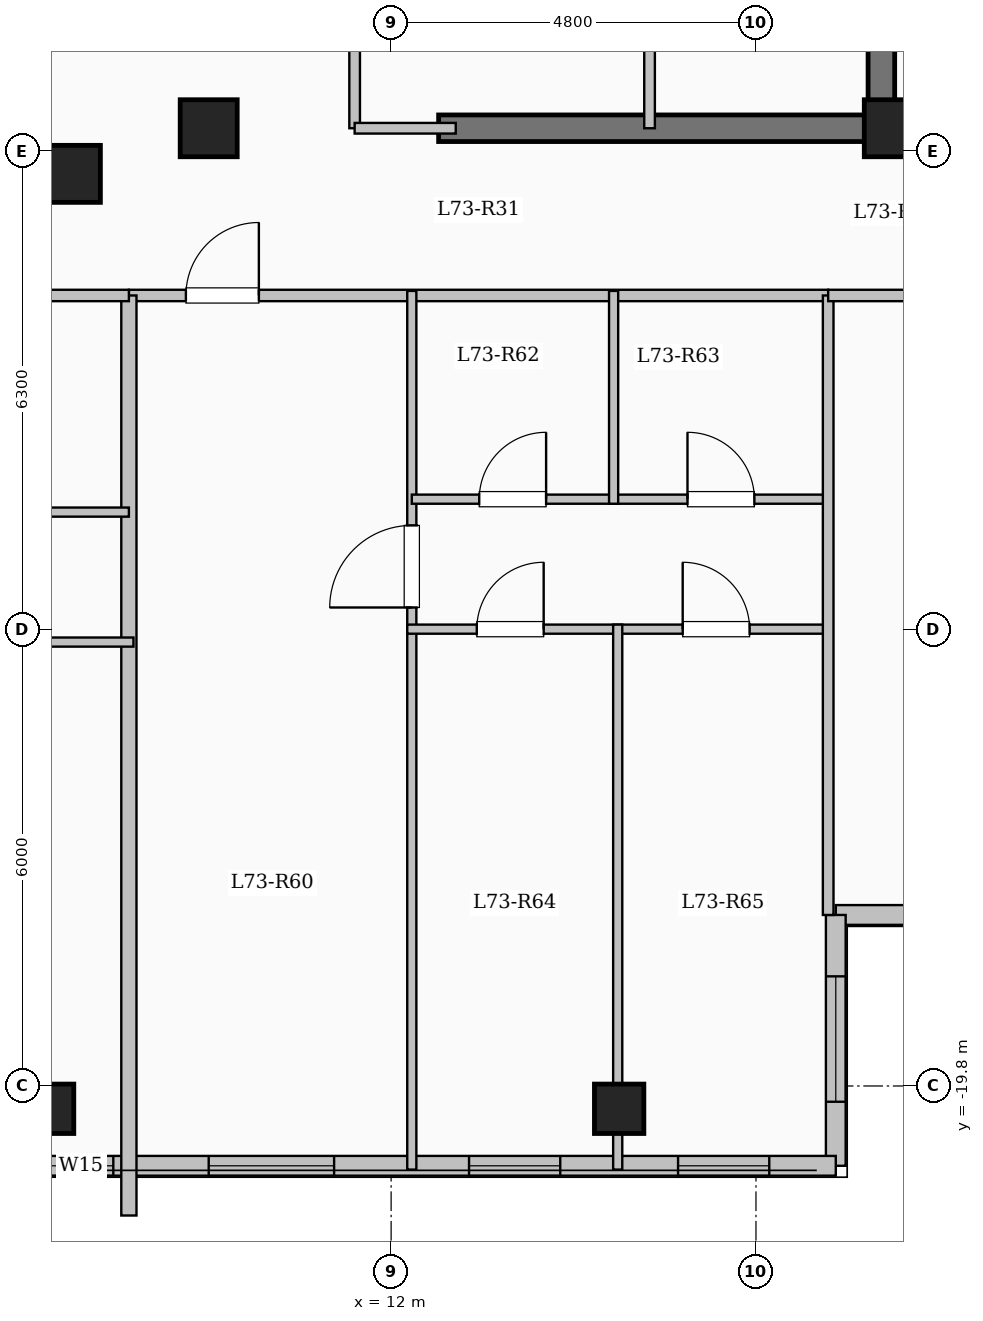
"""IFC4 building model, lengths in metres.
Left out: names, types, materials, properties, quantities, classifications, styles, units other than length and angle.
Written with IfcOpenShell. Run it as: python <this file> out.ifc"""

import sys

from ifc_helpers import new_model, si_unit, direction, frame, frame_2d, origin, origin_2d, place, context, subcontext, project, spatial, rectangle, extrude, element, fill, save


model = new_model("IFC4")
c1 = context("Model", 3, precision=1e-05, world=origin(), true_north=direction((0.0, 1.0)))
c2 = subcontext(c1, "Body", "Model", "MODEL_VIEW")
j1 = project(units=[si_unit("LENGTHUNIT", "METRE"), si_unit("PLANEANGLEUNIT", "RADIAN")], contexts=[c1])
p1 = place(None, origin())
s1 = spatial("IfcSite", under=j1, at=p1, CompositionType="ELEMENT")
p2 = place(p1, origin())
s2 = spatial("IfcBuilding", under=s1, at=p2, CompositionType="ELEMENT")
p3 = place(p2, frame((0.0, 0.0, 268.3)))
s3 = spatial("IfcBuildingStorey", under=s2, at=p3, CompositionType="ELEMENT", Elevation=268.3)
for number, where, z_axis, x_axis in (
    (1, (7.8, -7.8, 0.0), (0.0, 0.0, 1.0), (1.0, 0.0, 0.0)),
    (2, (9.6, -7.2, 0.0), (0.0, 0.0, 1.0), (1.0, 0.0, 0.0)),
    (3, (18.6, -7.2, 0.0), (0.0, 0.0, 1.0), (1.0, 0.0, 0.0)),
):
    element("IfcColumn", number, at=place(p3, frame(where, z_axis=z_axis, x_axis=x_axis)), inside=s3, PredefinedType="COLUMN", context=c2, shape_type="SweptSolid", body=[
        extrude(rectangle(XDim=0.75, YDim=0.75, at=origin_2d()), origin(), (0.0, 0.0, 1.0), 3.35),
    ])
for number, where, z_axis, x_axis in (
    (4, (7.5, -20.1, 0.0), (0.0, 0.0, 1.0), (1.0, 0.0, 0.0)),
    (5, (15.0, -20.1, 0.0), (0.0, 0.0, 1.0), (1.0, 0.0, 0.0)),
):
    element("IfcColumn", number, at=place(p3, frame(where, z_axis=z_axis, x_axis=x_axis)), inside=s3, PredefinedType="COLUMN", context=c2, shape_type="SweptSolid", body=[
        extrude(rectangle(XDim=0.65, YDim=0.65, at=origin_2d()), origin(), (0.0, 0.0, 1.0), 3.35),
    ])
p4 = place(p3, frame((22.65, -17.55, 0.0), z_axis=(0.0, 0.0, 1.0), x_axis=(-1.0, 0.0, 0.0)))
e6 = element("IfcWall", 6, at=p4, inside=s3, PredefinedType="SOLIDWALL", context=c2, shape_type="SweptSolid", body=[
    extrude(rectangle(XDim=4.8, YDim=0.26, at=frame_2d((2.4, 0.0))), origin(), (0.0, 0.0, 1.0), 3.05),
])
p5 = place(p4, frame((1.325, 0.0, 0.9)))
e7 = element("IfcOpeningElement", 7, at=p5, cuts=e6, PredefinedType="OPENING", context=c2, shape_type="SweptSolid", body=[
    extrude(rectangle(XDim=2.2, YDim=1.75, at=frame_2d((1.1, 0.875))), frame((0.0, 0.14, 0.0), z_axis=(0.0, -1.0, 0.0), x_axis=(1.0, 0.0, 0.0)), (0.0, 0.0, 1.0), 0.28),
])
p6 = place(p3, frame((17.85, -17.55, 0.0), z_axis=(0.0, 0.0, 1.0), x_axis=(0.0, -1.0, 0.0)))
e8 = element("IfcWall", 8, at=p6, inside=s3, PredefinedType="SOLIDWALL", context=c2, shape_type="SweptSolid", body=[
    extrude(rectangle(XDim=3.3, YDim=0.26, at=frame_2d((1.65, 0.0))), origin(), (0.0, 0.0, 1.0), 3.05),
])
p7 = place(p6, frame((0.808, 0.0, 0.9)))
e9 = element("IfcOpeningElement", 9, at=p7, cuts=e8, PredefinedType="OPENING", context=c2, shape_type="SweptSolid", body=[
    extrude(rectangle(XDim=1.65, YDim=1.6, at=frame_2d((0.825, 0.8))), frame((0.0, 0.14, 0.0), z_axis=(0.0, -1.0, 0.0), x_axis=(1.0, 0.0, 0.0)), (0.0, 0.0, 1.0), 0.28),
])
p8 = place(p3, frame((17.85, -20.85, 0.0), z_axis=(0.0, 0.0, 1.0), x_axis=(-1.0, 0.0, 0.0)))
e10 = element("IfcWall", 10, at=p8, inside=s3, PredefinedType="SOLIDWALL", context=c2, shape_type="SweptSolid", body=[
    extrude(rectangle(XDim=10.5, YDim=0.26, at=frame_2d((5.25, 0.0))), origin(), (0.0, 0.0, 1.0), 3.05),
])
p9 = place(p8, frame((0.875, 0.0, 0.95)))
e11 = element("IfcOpeningElement", 11, at=p9, cuts=e10, PredefinedType="OPENING", context=c2, shape_type="SweptSolid", body=[
    extrude(rectangle(XDim=1.2, YDim=1.5, at=frame_2d((0.6, 0.75))), frame((0.0, 0.14, 0.0), z_axis=(0.0, -1.0, 0.0), x_axis=(1.0, 0.0, 0.0)), (0.0, 0.0, 1.0), 0.28),
])
p10 = place(p8, frame((3.625, 0.0, 0.95)))
e12 = element("IfcOpeningElement", 12, at=p10, cuts=e10, PredefinedType="OPENING", context=c2, shape_type="SweptSolid", body=[
    extrude(rectangle(XDim=1.2, YDim=1.5, at=frame_2d((0.6, 0.75))), frame((0.0, 0.14, 0.0), z_axis=(0.0, -1.0, 0.0), x_axis=(1.0, 0.0, 0.0)), (0.0, 0.0, 1.0), 0.28),
])
p11 = place(p8, frame((6.6, 0.0, 0.9)))
e13 = element("IfcOpeningElement", 13, at=p11, cuts=e10, PredefinedType="OPENING", context=c2, shape_type="SweptSolid", body=[
    extrude(rectangle(XDim=1.65, YDim=1.6, at=frame_2d((0.825, 0.8))), frame((0.0, 0.14, 0.0), z_axis=(0.0, -1.0, 0.0), x_axis=(1.0, 0.0, 0.0)), (0.0, 0.0, 1.0), 0.28),
])
p12 = place(p8, frame((9.505, 0.0, 0.95)))
e14 = element("IfcOpeningElement", 14, at=p12, cuts=e10, PredefinedType="OPENING", context=c2, shape_type="SweptSolid", body=[
    extrude(rectangle(XDim=0.85, YDim=1.5, at=frame_2d((0.425, 0.75))), frame((0.0, 0.14, 0.0), z_axis=(0.0, -1.0, 0.0), x_axis=(1.0, 0.0, 0.0)), (0.0, 0.0, 1.0), 0.28),
])
p13 = place(p3, frame((18.45, -7.375, 0.0), z_axis=(0.0, 0.0, 1.0), x_axis=(0.0, 1.0, 0.0)))
e15 = element("IfcWall", 15, at=p13, inside=s3, PredefinedType="SHEAR", context=c2, shape_type="SweptSolid", body=[
    extrude(rectangle(XDim=14.05, YDim=0.35, at=frame_2d((7.025, 0.0))), origin(), (0.0, 0.0, 1.0), 3.35),
])
p14 = place(p3, frame((12.625, -7.2, 0.0), z_axis=(0.0, 0.0, 1.0), x_axis=(1.0, 0.0, 0.0)))
e16 = element("IfcWall", 16, at=p14, inside=s3, PredefinedType="SHEAR", context=c2, shape_type="SweptSolid", body=[
    extrude(rectangle(XDim=6.0, YDim=0.35, at=frame_2d((3.0, 0.0))), origin(), (0.0, 0.0, 1.0), 3.35),
])
p15 = place(p3, frame((15.4, -7.2, 0.0), z_axis=(0.0, 0.0, 1.0), x_axis=(0.0, 1.0, 0.0)))
e17 = element("IfcWall", 17, at=p15, inside=s3, PredefinedType="PARTITIONING", context=c2, shape_type="SweptSolid", body=[
    extrude(rectangle(XDim=10.45, YDim=0.14, at=frame_2d((5.225, 0.0))), origin(), (0.0, 0.0, 1.0), 3.05),
])
p16 = place(p15, frame((9.25, 0.0, 0.0)))
e18 = element("IfcOpeningElement", 18, at=p16, cuts=e17, PredefinedType="OPENING", context=c2, shape_type="SweptSolid", body=[
    extrude(rectangle(XDim=0.9, YDim=2.08, at=frame_2d((0.45, 1.04))), frame((0.0, 0.08, 0.0), z_axis=(0.0, -1.0, 0.0), x_axis=(1.0, 0.0, 0.0)), (0.0, 0.0, 1.0), 0.16),
])
p17 = place(p3, frame((11.52, -7.2, 0.0), z_axis=(0.0, 0.0, 1.0), x_axis=(0.0, 1.0, 0.0)))
e19 = element("IfcWall", 19, at=p17, inside=s3, PredefinedType="PARTITIONING", context=c2, shape_type="SweptSolid", body=[
    extrude(rectangle(XDim=9.12, YDim=0.14, at=frame_2d((4.56, 0.0))), origin(), (0.0, 0.0, 1.0), 3.05),
])
p18 = place(p17, frame((3.8, 0.0, 0.0)))
e20 = element("IfcOpeningElement", 20, at=p18, cuts=e19, PredefinedType="OPENING", context=c2, shape_type="SweptSolid", body=[
    extrude(rectangle(XDim=0.9, YDim=2.08, at=frame_2d((0.45, 1.04))), frame((0.0, 0.08, 0.0), z_axis=(0.0, -1.0, 0.0), x_axis=(1.0, 0.0, 0.0)), (0.0, 0.0, 1.0), 0.16),
])
p19 = place(p3, frame((11.52, -7.2, 0.0), z_axis=(0.0, 0.0, 1.0), x_axis=(1.0, 0.0, 0.0)))
e21 = element("IfcWall", 21, at=p19, inside=s3, PredefinedType="PARTITIONING", context=c2, shape_type="SweptSolid", body=[
    extrude(rectangle(XDim=1.33, YDim=0.14, at=frame_2d((0.665, 0.0))), origin(), (0.0, 0.0, 1.0), 2.22),
])
p20 = place(p3, frame((8.55, -9.4, 0.0), z_axis=(0.0, 0.0, 1.0), x_axis=(1.0, 0.0, 0.0)))
e22 = element("IfcWall", 22, at=p20, inside=s3, PredefinedType="PARTITIONING", context=c2, shape_type="SweptSolid", body=[
    extrude(rectangle(XDim=9.2, YDim=0.15, at=frame_2d((4.6, 0.0))), origin(), (0.0, 0.0, 1.0), 3.05),
])
p21 = place(p20, frame((0.75, 0.0, 0.0)))
e23 = element("IfcOpeningElement", 23, at=p21, cuts=e22, PredefinedType="OPENING", context=c2, shape_type="SweptSolid", body=[
    extrude(rectangle(XDim=0.96, YDim=2.15, at=frame_2d((0.48, 1.075))), frame((0.0, 0.085, 0.0), z_axis=(0.0, -1.0, 0.0), x_axis=(1.0, 0.0, 0.0)), (0.0, 0.0, 1.0), 0.17),
])
p22 = place(p3, frame((12.272, -20.9, 0.0), z_axis=(0.0, 0.0, 1.0), x_axis=(0.0, 1.0, 0.0)))
e24 = element("IfcWall", 24, at=p22, inside=s3, PredefinedType="PARTITIONING", context=c2, shape_type="SweptSolid", body=[
    extrude(rectangle(XDim=11.56, YDim=0.12, at=frame_2d((5.78, 0.0))), origin(), (0.0, 0.0, 1.0), 3.05),
])
p23 = place(p22, frame((7.395, 0.0, 0.0)))
e25 = element("IfcOpeningElement", 25, at=p23, cuts=e24, PredefinedType="OPENING", context=c2, shape_type="SweptSolid", body=[
    extrude(rectangle(XDim=1.08, YDim=2.15, at=frame_2d((0.54, 1.075))), frame((0.0, 0.07, 0.0), z_axis=(0.0, -1.0, 0.0), x_axis=(1.0, 0.0, 0.0)), (0.0, 0.0, 1.0), 0.14),
])
p24 = place(p3, frame((12.272, -12.08, 0.0), z_axis=(0.0, 0.0, 1.0), x_axis=(1.0, 0.0, 0.0)))
e26 = element("IfcWall", 26, at=p24, inside=s3, PredefinedType="PARTITIONING", context=c2, shape_type="SweptSolid", body=[
    extrude(rectangle(XDim=2.655, YDim=0.12, at=frame_2d((1.328, 0.0))), origin(), (0.0, 0.0, 1.0), 2.735),
])
p25 = place(p24, frame((0.887, 0.0, 0.0)))
e27 = element("IfcOpeningElement", 27, at=p25, cuts=e26, PredefinedType="OPENING", context=c2, shape_type="SweptSolid", body=[
    extrude(rectangle(XDim=0.88, YDim=2.1, at=frame_2d((0.44, 1.05))), frame((0.0, 0.07, 0.0), z_axis=(0.0, -1.0, 0.0), x_axis=(1.0, 0.0, 0.0)), (0.0, 0.0, 1.0), 0.14),
])
p26 = place(p3, frame((14.927, -12.08, 0.0), z_axis=(0.0, 0.0, 1.0), x_axis=(1.0, 0.0, 0.0)))
e28 = element("IfcWall", 28, at=p26, inside=s3, PredefinedType="PARTITIONING", context=c2, shape_type="SweptSolid", body=[
    extrude(rectangle(XDim=2.823, YDim=0.12, at=frame_2d((1.412, 0.0))), origin(), (0.0, 0.0, 1.0), 3.05),
])
p27 = place(p26, frame((0.972, 0.0, 0.0)))
e29 = element("IfcOpeningElement", 29, at=p27, cuts=e28, PredefinedType="OPENING", context=c2, shape_type="SweptSolid", body=[
    extrude(rectangle(XDim=0.88, YDim=2.1, at=frame_2d((0.44, 1.05))), frame((0.0, 0.07, 0.0), z_axis=(0.0, -1.0, 0.0), x_axis=(1.0, 0.0, 0.0)), (0.0, 0.0, 1.0), 0.14),
])
p28 = place(p3, frame((12.212, -13.79, 0.0), z_axis=(0.0, 0.0, 1.0), x_axis=(1.0, 0.0, 0.0)))
e30 = element("IfcWall", 30, at=p28, inside=s3, PredefinedType="PARTITIONING", context=c2, shape_type="SweptSolid", body=[
    extrude(rectangle(XDim=5.598, YDim=0.12, at=frame_2d((2.799, 0.0))), origin(), (0.0, 0.0, 1.0), 2.735),
])
p29 = place(p28, frame((0.915, 0.0, 0.0)))
e31 = element("IfcOpeningElement", 31, at=p29, cuts=e30, PredefinedType="OPENING", context=c2, shape_type="SweptSolid", body=[
    extrude(rectangle(XDim=0.88, YDim=2.1, at=frame_2d((0.44, 1.05))), frame((0.0, 0.07, 0.0), z_axis=(0.0, -1.0, 0.0), x_axis=(1.0, 0.0, 0.0)), (0.0, 0.0, 1.0), 0.14),
])
p30 = place(p28, frame((3.624, 0.0, 0.0)))
e32 = element("IfcOpeningElement", 32, at=p30, cuts=e30, PredefinedType="OPENING", context=c2, shape_type="SweptSolid", body=[
    extrude(rectangle(XDim=0.88, YDim=2.1, at=frame_2d((0.44, 1.05))), frame((0.0, 0.07, 0.0), z_axis=(0.0, -1.0, 0.0), x_axis=(1.0, 0.0, 0.0)), (0.0, 0.0, 1.0), 0.14),
])
p31 = place(p3, frame((14.927, -12.14, 0.0), z_axis=(0.0, 0.0, 1.0), x_axis=(0.0, 1.0, 0.0)))
e33 = element("IfcWall", 33, at=p31, inside=s3, PredefinedType="PARTITIONING", context=c2, shape_type="SweptSolid", body=[
    extrude(rectangle(XDim=2.8, YDim=0.12, at=frame_2d((1.4, 0.0))), origin(), (0.0, 0.0, 1.0), 2.635),
])
p32 = place(p3, frame((14.981, -20.9, 0.0), z_axis=(0.0, 0.0, 1.0), x_axis=(0.0, 1.0, 0.0)))
e34 = element("IfcWall", 34, at=p32, inside=s3, PredefinedType="PARTITIONING", context=c2, shape_type="SweptSolid", body=[
    extrude(rectangle(XDim=7.17, YDim=0.12, at=frame_2d((3.585, 0.0))), origin(), (0.0, 0.0, 1.0), 2.635),
])
p33 = place(p3, frame((8.55, -21.504, 0.0), z_axis=(0.0, 0.0, 1.0), x_axis=(0.0, 1.0, 0.0)))
e35 = element("IfcWall", 35, at=p33, inside=s3, PredefinedType="SOLIDWALL", context=c2, shape_type="SweptSolid", body=[
    extrude(rectangle(XDim=12.104, YDim=0.2, at=frame_2d((6.052, 0.0))), origin(), (0.0, 0.0, 1.0), 3.05),
])
p34 = place(p3, frame((-8.55, -9.4, 0.0), z_axis=(0.0, 0.0, 1.0), x_axis=(1.0, 0.0, 0.0)))
e36 = element("IfcWall", 36, at=p34, inside=s3, PredefinedType="PARTITIONING", context=c2, shape_type="SweptSolid", body=[
    extrude(rectangle(XDim=17.1, YDim=0.15, at=frame_2d((8.55, 0.0))), origin(), (0.0, 0.0, 1.0), 3.05),
])
p35 = place(p34, frame((1.75, 0.0, 0.0)))
e37 = element("IfcOpeningElement", 37, at=p35, cuts=e36, PredefinedType="OPENING", context=c2, shape_type="SweptSolid", body=[
    extrude(rectangle(XDim=0.96, YDim=2.15, at=frame_2d((0.48, 1.075))), frame((0.0, 0.085, 0.0), z_axis=(0.0, -1.0, 0.0), x_axis=(1.0, 0.0, 0.0)), (0.0, 0.0, 1.0), 0.17),
])
p36 = place(p3, frame((3.697, -12.25, 0.0), z_axis=(0.0, 0.0, 1.0), x_axis=(1.0, 0.0, 0.0)))
e38 = element("IfcWall", 38, at=p36, inside=s3, PredefinedType="PARTITIONING", context=c2, shape_type="SweptSolid", body=[
    extrude(rectangle(XDim=4.853, YDim=0.12, at=frame_2d((2.427, 0.0))), origin(), (0.0, 0.0, 1.0), 2.735),
])
p37 = place(p36, frame((1.987, 0.0, 0.0)))
e39 = element("IfcOpeningElement", 39, at=p37, cuts=e38, PredefinedType="OPENING", context=c2, shape_type="SweptSolid", body=[
    extrude(rectangle(XDim=0.88, YDim=2.1, at=frame_2d((0.44, 1.05))), frame((0.0, 0.07, 0.0), z_axis=(0.0, -1.0, 0.0), x_axis=(1.0, 0.0, 0.0)), (0.0, 0.0, 1.0), 0.14),
])
p38 = place(p3, frame((-1.756, -13.96, 0.0), z_axis=(0.0, 0.0, 1.0), x_axis=(1.0, 0.0, 0.0)))
e40 = element("IfcWall", 40, at=p38, inside=s3, PredefinedType="PARTITIONING", context=c2, shape_type="SweptSolid", body=[
    extrude(rectangle(XDim=10.366, YDim=0.12, at=frame_2d((5.183, 0.0))), origin(), (0.0, 0.0, 1.0), 2.735),
])
p39 = place(p38, frame((1.256, 0.0, 0.0)))
e41 = element("IfcOpeningElement", 41, at=p39, cuts=e40, PredefinedType="OPENING", context=c2, shape_type="SweptSolid", body=[
    extrude(rectangle(XDim=0.88, YDim=2.1, at=frame_2d((0.44, 1.05))), frame((0.0, 0.07, 0.0), z_axis=(0.0, -1.0, 0.0), x_axis=(1.0, 0.0, 0.0)), (0.0, 0.0, 1.0), 0.14),
])
p40 = place(p38, frame((4.648, 0.0, 0.0)))
e42 = element("IfcOpeningElement", 42, at=p40, cuts=e40, PredefinedType="OPENING", context=c2, shape_type="SweptSolid", body=[
    extrude(rectangle(XDim=0.88, YDim=2.1, at=frame_2d((0.44, 1.05))), frame((0.0, 0.07, 0.0), z_axis=(0.0, -1.0, 0.0), x_axis=(1.0, 0.0, 0.0)), (0.0, 0.0, 1.0), 0.14),
])
p41 = place(p38, frame((8.04, 0.0, 0.0)))
e43 = element("IfcOpeningElement", 43, at=p41, cuts=e40, PredefinedType="OPENING", context=c2, shape_type="SweptSolid", body=[
    extrude(rectangle(XDim=0.88, YDim=2.1, at=frame_2d((0.44, 1.05))), frame((0.0, 0.07, 0.0), z_axis=(0.0, -1.0, 0.0), x_axis=(1.0, 0.0, 0.0)), (0.0, 0.0, 1.0), 0.14),
])
p42 = place(p3, frame((18.45, -7.25, 0.0), z_axis=(0.0, 0.0, 1.0), x_axis=(1.0, 0.0, 0.0)))
e44 = element("IfcWall", 44, at=p42, inside=s3, PredefinedType="PARTITIONING", context=c2, shape_type="SweptSolid", body=[
    extrude(rectangle(XDim=4.23, YDim=0.15, at=frame_2d((2.115, 0.0))), origin(), (0.0, 0.0, 1.0), 3.05),
])
p43 = place(p42, frame((1.65, 0.0, 0.0)))
e45 = element("IfcOpeningElement", 45, at=p43, cuts=e44, PredefinedType="OPENING", context=c2, shape_type="SweptSolid", body=[
    extrude(rectangle(XDim=0.96, YDim=2.15, at=frame_2d((0.48, 1.075))), frame((0.0, 0.085, 0.0), z_axis=(0.0, -1.0, 0.0), x_axis=(1.0, 0.0, 0.0)), (0.0, 0.0, 1.0), 0.17),
])
p44 = place(p3, frame((17.75, -17.55, 0.0), z_axis=(0.0, 0.0, 1.0), x_axis=(0.0, 1.0, 0.0)))
e46 = element("IfcWall", 46, at=p44, inside=s3, PredefinedType="PARTITIONING", context=c2, shape_type="SweptSolid", body=[
    extrude(rectangle(XDim=8.15, YDim=0.14, at=frame_2d((4.075, 0.0))), origin(), (0.0, 0.0, 1.0), 3.05),
])
p45 = place(p3, frame((17.75, -9.4, 0.0), z_axis=(0.0, 0.0, 1.0), x_axis=(1.0, 0.0, 0.0)))
e47 = element("IfcWall", 47, at=p45, inside=s3, PredefinedType="PARTITIONING", context=c2, shape_type="SweptSolid", body=[
    extrude(rectangle(XDim=4.93, YDim=0.15, at=frame_2d((2.465, 0.0))), origin(), (0.0, 0.0, 1.0), 3.05),
])
p46 = place(p45, frame((1.99, 0.0, 0.0)))
e48 = element("IfcOpeningElement", 48, at=p46, cuts=e47, PredefinedType="OPENING", context=c2, shape_type="SweptSolid", body=[
    extrude(rectangle(XDim=0.95, YDim=2.15, at=frame_2d((0.475, 1.075))), frame((0.0, 0.085, 0.0), z_axis=(0.0, -1.0, 0.0), x_axis=(1.0, 0.0, 0.0)), (0.0, 0.0, 1.0), 0.17),
])
p47 = place(p7, origin())
e49 = element("IfcWindow", 49, at=p47, inside=s3, PartitioningType="SINGLE_PANEL", PredefinedType="WINDOW", context=c2, shape_type="SweptSolid", body=[
    extrude(rectangle(XDim=1.65, YDim=1.6, at=frame_2d((0.825, 0.8))), frame((0.0, 0.03, 0.0), z_axis=(0.0, -1.0, 0.0), x_axis=(1.0, 0.0, 0.0)), (0.0, 0.0, 1.0), 0.06),
])
fill(e9, e49)
p48 = place(p9, origin())
e50 = element("IfcWindow", 50, at=p48, inside=s3, PartitioningType="SINGLE_PANEL", PredefinedType="WINDOW", context=c2, shape_type="SweptSolid", body=[
    extrude(rectangle(XDim=1.2, YDim=1.5, at=frame_2d((0.6, 0.75))), frame((0.0, 0.03, 0.0), z_axis=(0.0, -1.0, 0.0), x_axis=(1.0, 0.0, 0.0)), (0.0, 0.0, 1.0), 0.06),
])
fill(e11, e50)
p49 = place(p10, origin())
e51 = element("IfcWindow", 51, at=p49, inside=s3, PartitioningType="SINGLE_PANEL", PredefinedType="WINDOW", context=c2, shape_type="SweptSolid", body=[
    extrude(rectangle(XDim=1.2, YDim=1.5, at=frame_2d((0.6, 0.75))), frame((0.0, 0.03, 0.0), z_axis=(0.0, -1.0, 0.0), x_axis=(1.0, 0.0, 0.0)), (0.0, 0.0, 1.0), 0.06),
])
fill(e12, e51)
p50 = place(p11, origin())
e52 = element("IfcWindow", 52, at=p50, inside=s3, PartitioningType="SINGLE_PANEL", PredefinedType="WINDOW", context=c2, shape_type="SweptSolid", body=[
    extrude(rectangle(XDim=1.65, YDim=1.6, at=frame_2d((0.825, 0.8))), frame((0.0, 0.03, 0.0), z_axis=(0.0, -1.0, 0.0), x_axis=(1.0, 0.0, 0.0)), (0.0, 0.0, 1.0), 0.06),
])
fill(e13, e52)
p51 = place(p12, origin())
e53 = element("IfcWindow", 53, at=p51, inside=s3, PartitioningType="SINGLE_PANEL", PredefinedType="WINDOW", context=c2, shape_type="SweptSolid", body=[
    extrude(rectangle(XDim=0.85, YDim=1.5, at=frame_2d((0.425, 0.75))), frame((0.0, 0.03, 0.0), z_axis=(0.0, -1.0, 0.0), x_axis=(1.0, 0.0, 0.0)), (0.0, 0.0, 1.0), 0.06),
])
fill(e14, e53)
p52 = place(p21, origin())
e54 = element("IfcDoor", 54, at=p52, inside=s3, OperationType="SINGLE_SWING_RIGHT", PredefinedType="DOOR", context=c2, shape_type="SweptSolid", body=[
    extrude(rectangle(XDim=0.96, YDim=2.15, at=frame_2d((0.48, 1.075))), frame((0.0, 0.025, 0.0), z_axis=(0.0, -1.0, 0.0), x_axis=(1.0, 0.0, 0.0)), (0.0, 0.0, 1.0), 0.05),
])
fill(e23, e54)
p53 = place(p23, origin())
e55 = element("IfcDoor", 55, at=p53, inside=s3, OperationType="SINGLE_SWING_LEFT", PredefinedType="DOOR", context=c2, shape_type="SweptSolid", body=[
    extrude(rectangle(XDim=1.08, YDim=2.15, at=frame_2d((0.54, 1.075))), frame((0.0, 0.025, 0.0), z_axis=(0.0, -1.0, 0.0), x_axis=(1.0, 0.0, 0.0)), (0.0, 0.0, 1.0), 0.05),
])
fill(e25, e55)
p54 = place(p25, origin())
e56 = element("IfcDoor", 56, at=p54, inside=s3, OperationType="SINGLE_SWING_RIGHT", PredefinedType="DOOR", context=c2, shape_type="SweptSolid", body=[
    extrude(rectangle(XDim=0.88, YDim=2.1, at=frame_2d((0.44, 1.05))), frame((0.0, 0.025, 0.0), z_axis=(0.0, -1.0, 0.0), x_axis=(1.0, 0.0, 0.0)), (0.0, 0.0, 1.0), 0.05),
])
fill(e27, e56)
p55 = place(p27, origin())
e57 = element("IfcDoor", 57, at=p55, inside=s3, OperationType="SINGLE_SWING_LEFT", PredefinedType="DOOR", context=c2, shape_type="SweptSolid", body=[
    extrude(rectangle(XDim=0.88, YDim=2.1, at=frame_2d((0.44, 1.05))), frame((0.0, 0.025, 0.0), z_axis=(0.0, -1.0, 0.0), x_axis=(1.0, 0.0, 0.0)), (0.0, 0.0, 1.0), 0.05),
])
fill(e29, e57)
p56 = place(p29, origin())
e58 = element("IfcDoor", 58, at=p56, inside=s3, OperationType="SINGLE_SWING_RIGHT", PredefinedType="DOOR", context=c2, shape_type="SweptSolid", body=[
    extrude(rectangle(XDim=0.88, YDim=2.1, at=frame_2d((0.44, 1.05))), frame((0.0, 0.025, 0.0), z_axis=(0.0, -1.0, 0.0), x_axis=(1.0, 0.0, 0.0)), (0.0, 0.0, 1.0), 0.05),
])
fill(e31, e58)
p57 = place(p30, origin())
e59 = element("IfcDoor", 59, at=p57, inside=s3, OperationType="SINGLE_SWING_LEFT", PredefinedType="DOOR", context=c2, shape_type="SweptSolid", body=[
    extrude(rectangle(XDim=0.88, YDim=2.1, at=frame_2d((0.44, 1.05))), frame((0.0, 0.025, 0.0), z_axis=(0.0, -1.0, 0.0), x_axis=(1.0, 0.0, 0.0)), (0.0, 0.0, 1.0), 0.05),
])
fill(e32, e59)
save(model, sys.argv[1])
